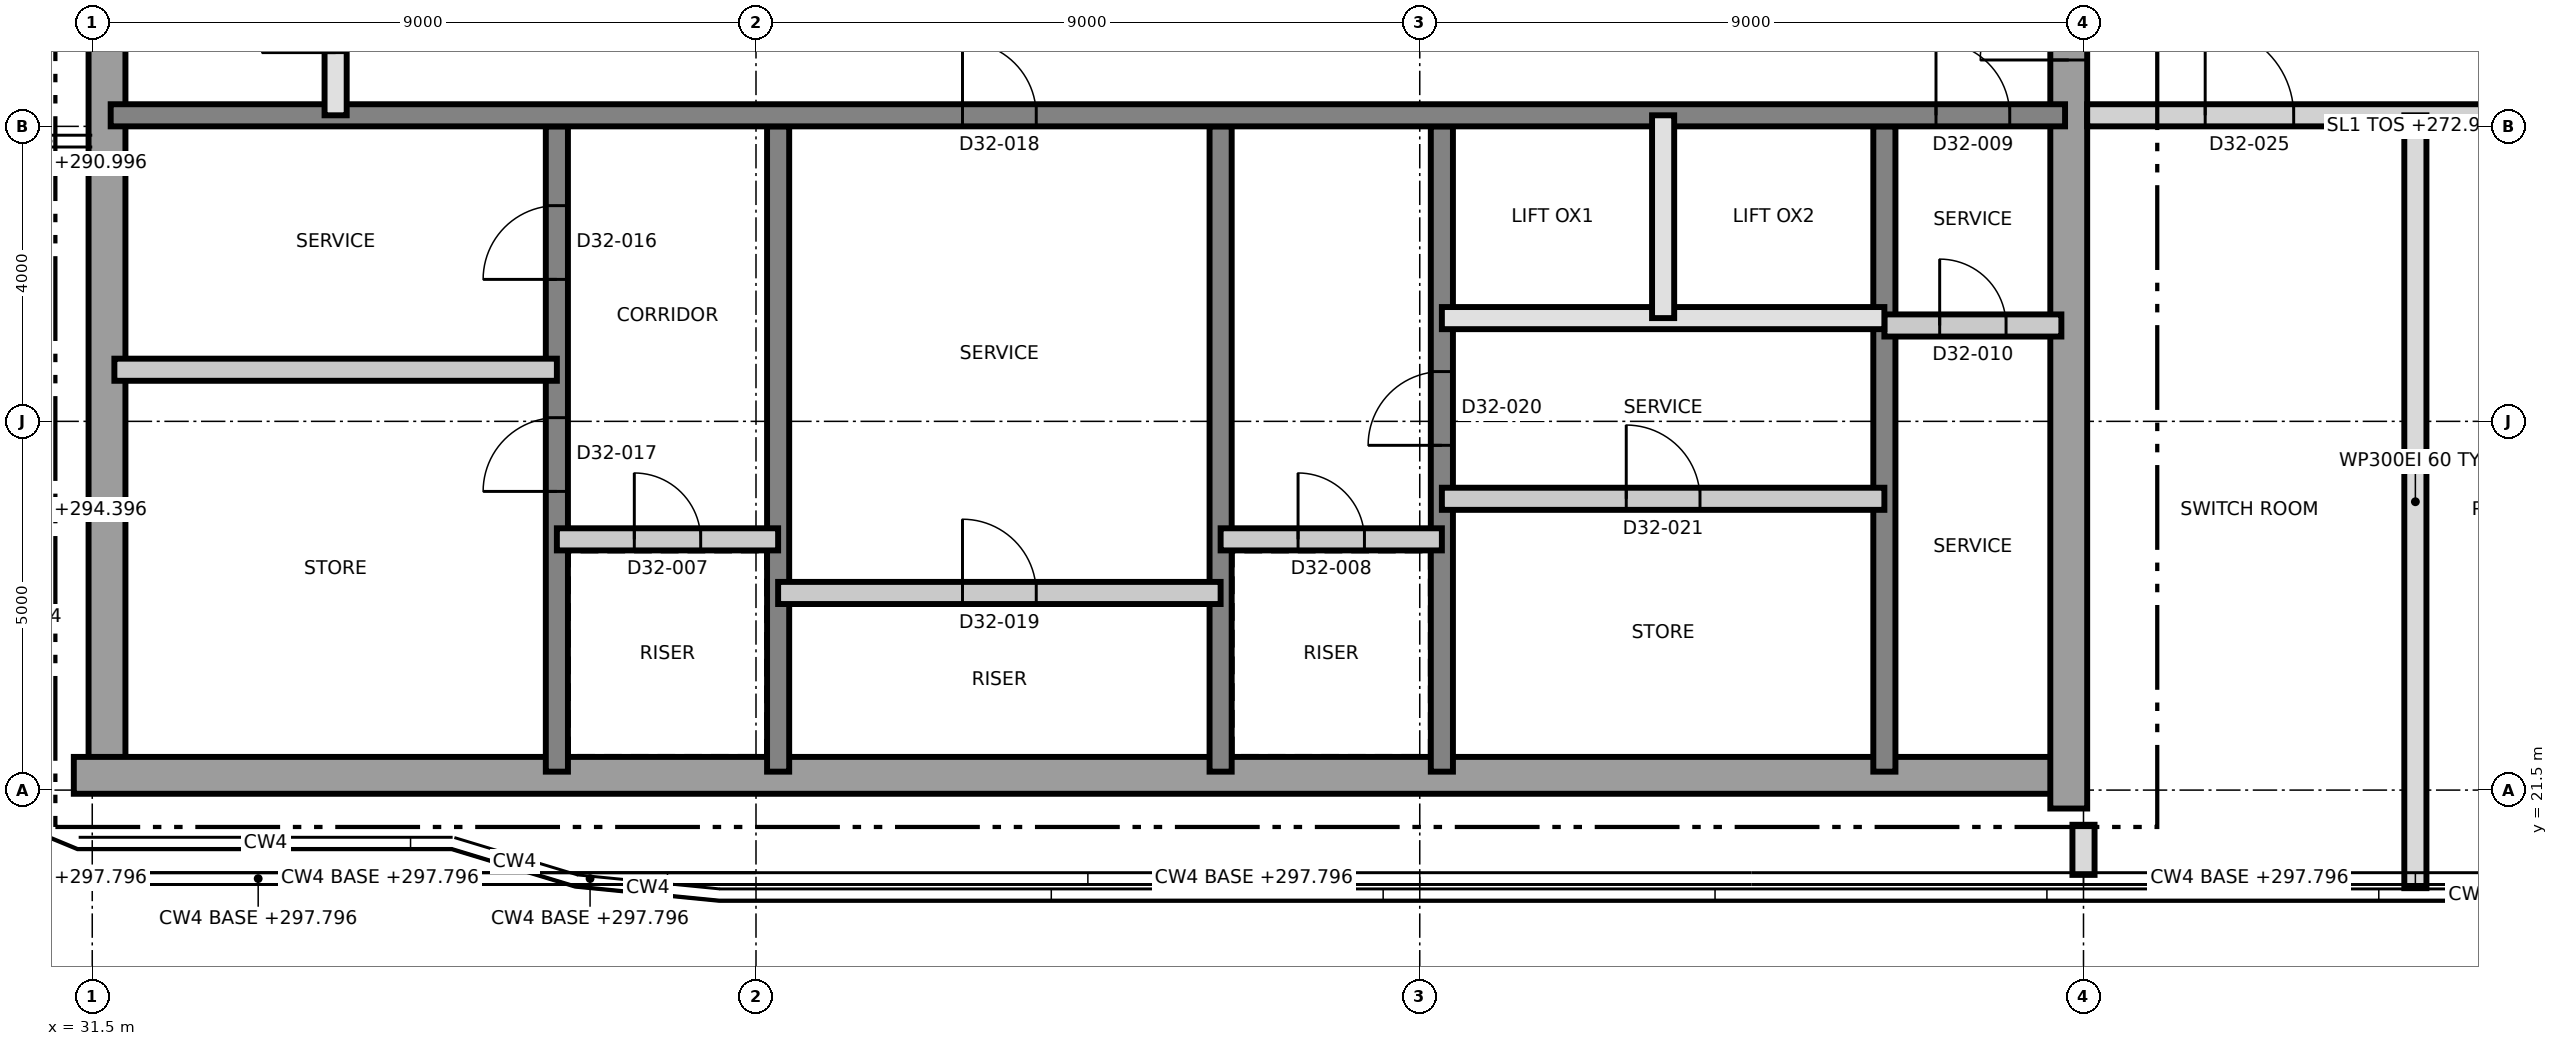
"""IFC4 building model, lengths in metres.
Left out: names, types, materials, properties, quantities, classifications, styles, units other than length and angle.
Written with IfcOpenShell. Run it as: python <this file> out.ifc"""

import sys

from ifc_helpers import new_model, si_unit, direction, frame, frame_2d, origin, place, context, subcontext, project, spatial, rectangle, extrude, element, fill, save


model = new_model("IFC4")
c1 = context("Model", 3, precision=1e-05, world=origin(), true_north=direction((0.0, 1.0)))
c2 = subcontext(c1, "Body", "Model", "MODEL_VIEW")
j1 = project(units=[si_unit("LENGTHUNIT", "METRE"), si_unit("PLANEANGLEUNIT", "RADIAN")], contexts=[c1])
p1 = place(None, origin())
s1 = spatial("IfcSite", under=j1, at=p1, CompositionType="ELEMENT")
p2 = place(p1, origin())
s2 = spatial("IfcBuilding", under=s1, at=p2, CompositionType="ELEMENT")
p3 = place(p2, frame((0.0, 0.0, 272.9)))
s3 = spatial("IfcBuildingStorey", under=s2, at=p3, CompositionType="ELEMENT", Elevation=272.9)
p4 = place(p3, frame((31.7, 21.75, 0.0), z_axis=(0.0, 0.0, 1.0), x_axis=(0.0, 1.0, 0.0)))
e1 = element("IfcWall", 1, at=p4, inside=s3, PredefinedType="SHEAR", context=c2, shape_type="SweptSolid", body=[
    extrude(rectangle(XDim=17.5, YDim=0.5, at=frame_2d((8.75, 0.0))), origin(), (0.0, 0.0, 1.0), 4.2),
])
p5 = place(p3, frame((31.25, 21.7, 0.0), z_axis=(0.0, 0.0, 1.0), x_axis=(1.0, 0.0, 0.0)))
e2 = element("IfcWall", 2, at=p5, inside=s3, PredefinedType="SHEAR", context=c2, shape_type="SweptSolid", body=[
    extrude(rectangle(XDim=27.0, YDim=0.5, at=frame_2d((13.5, 0.0))), origin(), (0.0, 0.0, 1.0), 4.2),
])
p6 = place(p3, frame((58.3, 21.25, 0.0), z_axis=(0.0, 0.0, 1.0), x_axis=(0.0, 1.0, 0.0)))
e3 = element("IfcWall", 3, at=p6, inside=s3, PredefinedType="SHEAR", context=c2, shape_type="SweptSolid", body=[
    extrude(rectangle(XDim=18.5, YDim=0.5, at=frame_2d((9.25, 0.0))), origin(), (0.0, 0.0, 1.0), 4.2),
])
p7 = place(p6, frame((10.15, 0.0, 0.0)))
e4 = element("IfcOpeningElement", 4, at=p7, cuts=e3, PredefinedType="OPENING", context=c2, shape_type="SweptSolid", body=[
    extrude(rectangle(XDim=1.2, YDim=2.1, at=frame_2d((0.6, 1.05))), frame((0.0, 0.26, 0.0), z_axis=(0.0, -1.0, 0.0), x_axis=(1.0, 0.0, 0.0)), (0.0, 0.0, 1.0), 0.52),
])
p8 = place(p3, frame((37.8, 21.75, 0.0), z_axis=(0.0, 0.0, 1.0), x_axis=(0.0, 1.0, 0.0)))
e5 = element("IfcWall", 5, at=p8, inside=s3, PredefinedType="SHEAR", context=c2, shape_type="SweptSolid", body=[
    extrude(rectangle(XDim=8.75, YDim=0.3, at=frame_2d((4.375, 0.0))), origin(), (0.0, 0.0, 1.0), 4.2),
])
p9 = place(p8, frame((6.675, 0.0, 0.0)))
e6 = element("IfcOpeningElement", 6, at=p9, cuts=e5, PredefinedType="OPENING", context=c2, shape_type="SweptSolid", body=[
    extrude(rectangle(XDim=1.0, YDim=2.1, at=frame_2d((0.5, 1.05))), frame((0.0, 0.16, 0.0), z_axis=(0.0, -1.0, 0.0), x_axis=(1.0, 0.0, 0.0)), (0.0, 0.0, 1.0), 0.32),
])
p10 = place(p8, frame((3.8, 0.0, 0.0)))
e7 = element("IfcOpeningElement", 7, at=p10, cuts=e5, PredefinedType="OPENING", context=c2, shape_type="SweptSolid", body=[
    extrude(rectangle(XDim=1.0, YDim=2.1, at=frame_2d((0.5, 1.05))), frame((0.0, 0.16, 0.0), z_axis=(0.0, -1.0, 0.0), x_axis=(1.0, 0.0, 0.0)), (0.0, 0.0, 1.0), 0.32),
])
for number, where, z_axis, x_axis in (
    (8, (40.8, 21.75, 0.0), (0.0, 0.0, 1.0), (0.0, 1.0, 0.0)),
    (9, (46.8, 21.75, 0.0), (0.0, 0.0, 1.0), (0.0, 1.0, 0.0)),
):
    element("IfcWall", number, at=place(p3, frame(where, z_axis=z_axis, x_axis=x_axis)), inside=s3, PredefinedType="SHEAR", context=c2, shape_type="SweptSolid", body=[
        extrude(rectangle(XDim=8.75, YDim=0.3, at=frame_2d((4.375, 0.0))), origin(), (0.0, 0.0, 1.0), 4.2),
    ])
p11 = place(p3, frame((49.8, 21.75, 0.0), z_axis=(0.0, 0.0, 1.0), x_axis=(0.0, 1.0, 0.0)))
e10 = element("IfcWall", 10, at=p11, inside=s3, PredefinedType="SHEAR", context=c2, shape_type="SweptSolid", body=[
    extrude(rectangle(XDim=8.75, YDim=0.3, at=frame_2d((4.375, 0.0))), origin(), (0.0, 0.0, 1.0), 4.2),
])
p12 = place(p11, frame((4.425, 0.0, 0.0)))
e11 = element("IfcOpeningElement", 11, at=p12, cuts=e10, PredefinedType="OPENING", context=c2, shape_type="SweptSolid", body=[
    extrude(rectangle(XDim=1.0, YDim=2.1, at=frame_2d((0.5, 1.05))), frame((0.0, 0.16, 0.0), z_axis=(0.0, -1.0, 0.0), x_axis=(1.0, 0.0, 0.0)), (0.0, 0.0, 1.0), 0.32),
])
p13 = place(p3, frame((55.8, 21.75, 0.0), z_axis=(0.0, 0.0, 1.0), x_axis=(0.0, 1.0, 0.0)))
e12 = element("IfcWall", 12, at=p13, inside=s3, PredefinedType="SHEAR", context=c2, shape_type="SweptSolid", body=[
    extrude(rectangle(XDim=8.75, YDim=0.3, at=frame_2d((4.375, 0.0))), origin(), (0.0, 0.0, 1.0), 4.2),
])
p14 = place(p3, frame((31.75, 30.65, 0.0), z_axis=(0.0, 0.0, 1.0), x_axis=(1.0, 0.0, 0.0)))
e13 = element("IfcWall", 13, at=p14, inside=s3, PredefinedType="SHEAR", context=c2, shape_type="SweptSolid", body=[
    extrude(rectangle(XDim=26.5, YDim=0.3, at=frame_2d((13.25, 0.0))), origin(), (0.0, 0.0, 1.0), 4.2),
])
p15 = place(p14, frame((24.75, 0.0, 0.0)))
e14 = element("IfcOpeningElement", 14, at=p15, cuts=e13, PredefinedType="OPENING", context=c2, shape_type="SweptSolid", body=[
    extrude(rectangle(XDim=1.0, YDim=2.1, at=frame_2d((0.5, 1.05))), frame((0.0, 0.16, 0.0), z_axis=(0.0, -1.0, 0.0), x_axis=(1.0, 0.0, 0.0)), (0.0, 0.0, 1.0), 0.32),
])
p16 = place(p14, frame((11.55, 0.0, 0.0)))
e15 = element("IfcOpeningElement", 15, at=p16, cuts=e13, PredefinedType="OPENING", context=c2, shape_type="SweptSolid", body=[
    extrude(rectangle(XDim=1.0, YDim=2.1, at=frame_2d((0.5, 1.05))), frame((0.0, 0.16, 0.0), z_axis=(0.0, -1.0, 0.0), x_axis=(1.0, 0.0, 0.0)), (0.0, 0.0, 1.0), 0.32),
])
p17 = place(p3, frame((40.8, 24.173, 0.0), z_axis=(0.0, 0.0, 1.0), x_axis=(1.0, 0.0, 0.0)))
e16 = element("IfcWall", 16, at=p17, inside=s3, PredefinedType="PARTITIONING", context=c2, shape_type="SweptSolid", body=[
    extrude(rectangle(XDim=6.0, YDim=0.3, at=frame_2d((3.0, 0.0))), origin(), (0.0, 0.0, 1.0), 3.9),
])
p18 = place(p17, frame((2.5, 0.0, 0.0)))
e17 = element("IfcOpeningElement", 17, at=p18, cuts=e16, PredefinedType="OPENING", context=c2, shape_type="SweptSolid", body=[
    extrude(rectangle(XDim=1.0, YDim=2.1, at=frame_2d((0.5, 1.05))), frame((0.0, 0.16, 0.0), z_axis=(0.0, -1.0, 0.0), x_axis=(1.0, 0.0, 0.0)), (0.0, 0.0, 1.0), 0.32),
])
p19 = place(p3, frame((37.8, 24.9, 0.0), z_axis=(0.0, 0.0, 1.0), x_axis=(1.0, 0.0, 0.0)))
e18 = element("IfcWall", 18, at=p19, inside=s3, PredefinedType="PARTITIONING", context=c2, shape_type="SweptSolid", body=[
    extrude(rectangle(XDim=3.0, YDim=0.3, at=frame_2d((1.5, 0.0))), origin(), (0.0, 0.0, 1.0), 3.9),
])
p20 = place(p19, frame((1.05, 0.0, 0.0)))
e19 = element("IfcOpeningElement", 19, at=p20, cuts=e18, PredefinedType="OPENING", context=c2, shape_type="SweptSolid", body=[
    extrude(rectangle(XDim=0.9, YDim=2.1, at=frame_2d((0.45, 1.05))), frame((0.0, 0.16, 0.0), z_axis=(0.0, -1.0, 0.0), x_axis=(1.0, 0.0, 0.0)), (0.0, 0.0, 1.0), 0.32),
])
p21 = place(p3, frame((46.8, 24.9, 0.0), z_axis=(0.0, 0.0, 1.0), x_axis=(1.0, 0.0, 0.0)))
e20 = element("IfcWall", 20, at=p21, inside=s3, PredefinedType="PARTITIONING", context=c2, shape_type="SweptSolid", body=[
    extrude(rectangle(XDim=3.0, YDim=0.3, at=frame_2d((1.5, 0.0))), origin(), (0.0, 0.0, 1.0), 3.9),
])
p22 = place(p21, frame((1.05, 0.0, 0.0)))
e21 = element("IfcOpeningElement", 21, at=p22, cuts=e20, PredefinedType="OPENING", context=c2, shape_type="SweptSolid", body=[
    extrude(rectangle(XDim=0.9, YDim=2.1, at=frame_2d((0.45, 1.05))), frame((0.0, 0.16, 0.0), z_axis=(0.0, -1.0, 0.0), x_axis=(1.0, 0.0, 0.0)), (0.0, 0.0, 1.0), 0.32),
])
p23 = place(p3, frame((49.8, 25.45, 0.0), z_axis=(0.0, 0.0, 1.0), x_axis=(1.0, 0.0, 0.0)))
e22 = element("IfcWall", 22, at=p23, inside=s3, PredefinedType="PARTITIONING", context=c2, shape_type="SweptSolid", body=[
    extrude(rectangle(XDim=6.0, YDim=0.3, at=frame_2d((3.0, 0.0))), origin(), (0.0, 0.0, 1.0), 3.9),
])
p24 = place(p23, frame((2.5, 0.0, 0.0)))
e23 = element("IfcOpeningElement", 23, at=p24, cuts=e22, PredefinedType="OPENING", context=c2, shape_type="SweptSolid", body=[
    extrude(rectangle(XDim=1.0, YDim=2.1, at=frame_2d((0.5, 1.05))), frame((0.0, 0.16, 0.0), z_axis=(0.0, -1.0, 0.0), x_axis=(1.0, 0.0, 0.0)), (0.0, 0.0, 1.0), 0.32),
])
p25 = place(p3, frame((31.8, 27.2, 0.0), z_axis=(0.0, 0.0, 1.0), x_axis=(1.0, 0.0, 0.0)))
e24 = element("IfcWall", 24, at=p25, inside=s3, PredefinedType="PARTITIONING", context=c2, shape_type="SweptSolid", body=[
    extrude(rectangle(XDim=6.0, YDim=0.3, at=frame_2d((3.0, 0.0))), origin(), (0.0, 0.0, 1.0), 3.9),
])
p26 = place(p3, frame((55.8, 27.8, 0.0), z_axis=(0.0, 0.0, 1.0), x_axis=(1.0, 0.0, 0.0)))
e25 = element("IfcWall", 25, at=p26, inside=s3, PredefinedType="PARTITIONING", context=c2, shape_type="SweptSolid", body=[
    extrude(rectangle(XDim=2.4, YDim=0.3, at=frame_2d((1.2, 0.0))), origin(), (0.0, 0.0, 1.0), 3.9),
])
p27 = place(p26, frame((0.75, 0.0, 0.0)))
e26 = element("IfcOpeningElement", 26, at=p27, cuts=e25, PredefinedType="OPENING", context=c2, shape_type="SweptSolid", body=[
    extrude(rectangle(XDim=0.9, YDim=2.1, at=frame_2d((0.45, 1.05))), frame((0.0, 0.16, 0.0), z_axis=(0.0, -1.0, 0.0), x_axis=(1.0, 0.0, 0.0)), (0.0, 0.0, 1.0), 0.32),
])
p28 = place(p3, frame((49.8, 27.9, 0.0), z_axis=(0.0, 0.0, 1.0), x_axis=(1.0, 0.0, 0.0)))
e27 = element("IfcWall", 27, at=p28, inside=s3, PredefinedType="SOLIDWALL", context=c2, shape_type="SweptSolid", body=[
    extrude(rectangle(XDim=6.0, YDim=0.3, at=frame_2d((3.0, 0.0))), origin(), (0.0, 0.0, 1.0), 3.9),
])
p29 = place(p3, frame((34.8, 30.65, 0.0), z_axis=(0.0, 0.0, 1.0), x_axis=(0.0, 1.0, 0.0)))
e28 = element("IfcWall", 28, at=p29, inside=s3, PredefinedType="SOLIDWALL", context=c2, shape_type="SweptSolid", body=[
    extrude(rectangle(XDim=2.7, YDim=0.3, at=frame_2d((1.35, 0.0))), origin(), (0.0, 0.0, 1.0), 3.9),
])
p30 = place(p29, frame((0.85, 0.0, 0.0)))
e29 = element("IfcOpeningElement", 29, at=p30, cuts=e28, PredefinedType="OPENING", context=c2, shape_type="SweptSolid", body=[
    extrude(rectangle(XDim=1.0, YDim=2.1, at=frame_2d((0.5, 1.05))), frame((0.0, 0.16, 0.0), z_axis=(0.0, -1.0, 0.0), x_axis=(1.0, 0.0, 0.0)), (0.0, 0.0, 1.0), 0.32),
])
p31 = place(p3, frame((52.8, 27.9, 0.0), z_axis=(0.0, 0.0, 1.0), x_axis=(0.0, 1.0, 0.0)))
e30 = element("IfcWall", 30, at=p31, inside=s3, PredefinedType="SOLIDWALL", context=c2, shape_type="SweptSolid", body=[
    extrude(rectangle(XDim=2.75, YDim=0.3, at=frame_2d((1.375, 0.0))), origin(), (0.0, 0.0, 1.0), 3.9),
])
p32 = place(p3, frame((58.55, 30.65, 0.0), z_axis=(0.0, 0.0, 1.0), x_axis=(1.0, 0.0, 0.0)))
e31 = element("IfcWall", 31, at=p32, inside=s3, PredefinedType="PARTITIONING", context=c2, shape_type="SweptSolid", body=[
    extrude(rectangle(XDim=26.78, YDim=0.3, at=frame_2d((13.39, 0.0))), origin(), (0.0, 0.0, 1.0), 3.9),
])
p33 = place(p32, frame((1.6, 0.0, 0.0)))
e32 = element("IfcOpeningElement", 32, at=p33, cuts=e31, PredefinedType="OPENING", context=c2, shape_type="SweptSolid", body=[
    extrude(rectangle(XDim=1.2, YDim=2.1, at=frame_2d((0.6, 1.05))), frame((0.0, 0.16, 0.0), z_axis=(0.0, -1.0, 0.0), x_axis=(1.0, 0.0, 0.0)), (0.0, 0.0, 1.0), 0.32),
])
p34 = place(p32, frame((6.1, 0.0, 0.0)))
e33 = element("IfcOpeningElement", 33, at=p34, cuts=e31, PredefinedType="OPENING", context=c2, shape_type="SweptSolid", body=[
    extrude(rectangle(XDim=1.2, YDim=2.1, at=frame_2d((0.6, 1.05))), frame((0.0, 0.16, 0.0), z_axis=(0.0, -1.0, 0.0), x_axis=(1.0, 0.0, 0.0)), (0.0, 0.0, 1.0), 0.32),
])
p35 = place(p32, frame((10.6, 0.0, 0.0)))
e34 = element("IfcOpeningElement", 34, at=p35, cuts=e31, PredefinedType="OPENING", context=c2, shape_type="SweptSolid", body=[
    extrude(rectangle(XDim=1.2, YDim=2.1, at=frame_2d((0.6, 1.05))), frame((0.0, 0.16, 0.0), z_axis=(0.0, -1.0, 0.0), x_axis=(1.0, 0.0, 0.0)), (0.0, 0.0, 1.0), 0.32),
])
p36 = place(p32, frame((15.1, 0.0, 0.0)))
e35 = element("IfcOpeningElement", 35, at=p36, cuts=e31, PredefinedType="OPENING", context=c2, shape_type="SweptSolid", body=[
    extrude(rectangle(XDim=1.2, YDim=2.1, at=frame_2d((0.6, 1.05))), frame((0.0, 0.16, 0.0), z_axis=(0.0, -1.0, 0.0), x_axis=(1.0, 0.0, 0.0)), (0.0, 0.0, 1.0), 0.32),
])
p37 = place(p32, frame((19.6, 0.0, 0.0)))
e36 = element("IfcOpeningElement", 36, at=p37, cuts=e31, PredefinedType="OPENING", context=c2, shape_type="SweptSolid", body=[
    extrude(rectangle(XDim=1.2, YDim=2.1, at=frame_2d((0.6, 1.05))), frame((0.0, 0.16, 0.0), z_axis=(0.0, -1.0, 0.0), x_axis=(1.0, 0.0, 0.0)), (0.0, 0.0, 1.0), 0.32),
])
p38 = place(p32, frame((24.1, 0.0, 0.0)))
e37 = element("IfcOpeningElement", 37, at=p38, cuts=e31, PredefinedType="OPENING", context=c2, shape_type="SweptSolid", body=[
    extrude(rectangle(XDim=1.2, YDim=2.1, at=frame_2d((0.6, 1.05))), frame((0.0, 0.16, 0.0), z_axis=(0.0, -1.0, 0.0), x_axis=(1.0, 0.0, 0.0)), (0.0, 0.0, 1.0), 0.32),
])
p39 = place(p3, frame((58.5, 20.35, 0.0), z_axis=(0.0, 0.0, 1.0), x_axis=(0.0, 1.0, 0.0)))
e38 = element("IfcWall", 38, at=p39, inside=s3, PredefinedType="PARTITIONING", context=c2, shape_type="SweptSolid", body=[
    extrude(rectangle(XDim=0.68, YDim=0.3, at=frame_2d((0.34, 0.0))), origin(), (0.0, 0.0, 1.0), 3.9),
])
p40 = place(p3, frame((63.0, 20.17, 0.0), z_axis=(0.0, 0.0, 1.0), x_axis=(0.0, 1.0, 0.0)))
e39 = element("IfcWall", 39, at=p40, inside=s3, PredefinedType="PARTITIONING", context=c2, shape_type="SweptSolid", body=[
    extrude(rectangle(XDim=10.48, YDim=0.3, at=frame_2d((5.24, 0.0))), origin(), (0.0, 0.0, 1.0), 3.9),
])
p41 = place(p20, origin())
e40 = element("IfcDoor", 40, at=p41, inside=s3, OperationType="SINGLE_SWING_LEFT", PredefinedType="DOOR", context=c2, shape_type="SweptSolid", body=[
    extrude(rectangle(XDim=0.9, YDim=2.1, at=frame_2d((0.45, 1.05))), frame((0.0, 0.025, 0.0), z_axis=(0.0, -1.0, 0.0), x_axis=(1.0, 0.0, 0.0)), (0.0, 0.0, 1.0), 0.05),
])
fill(e19, e40)
p42 = place(p22, origin())
e41 = element("IfcDoor", 41, at=p42, inside=s3, OperationType="SINGLE_SWING_RIGHT", PredefinedType="DOOR", context=c2, shape_type="SweptSolid", body=[
    extrude(rectangle(XDim=0.9, YDim=2.1, at=frame_2d((0.45, 1.05))), frame((0.0, 0.025, 0.0), z_axis=(0.0, -1.0, 0.0), x_axis=(1.0, 0.0, 0.0)), (0.0, 0.0, 1.0), 0.05),
])
fill(e21, e41)
p43 = place(p15, origin())
e42 = element("IfcDoor", 42, at=p43, inside=s3, OperationType="SINGLE_SWING_LEFT", PredefinedType="DOOR", context=c2, shape_type="SweptSolid", body=[
    extrude(rectangle(XDim=1.0, YDim=2.1, at=frame_2d((0.5, 1.05))), frame((0.0, 0.025, 0.0), z_axis=(0.0, -1.0, 0.0), x_axis=(1.0, 0.0, 0.0)), (0.0, 0.0, 1.0), 0.05),
])
fill(e14, e42)
p44 = place(p27, origin())
e43 = element("IfcDoor", 43, at=p44, inside=s3, OperationType="SINGLE_SWING_RIGHT", PredefinedType="DOOR", context=c2, shape_type="SweptSolid", body=[
    extrude(rectangle(XDim=0.9, YDim=2.1, at=frame_2d((0.45, 1.05))), frame((0.0, 0.025, 0.0), z_axis=(0.0, -1.0, 0.0), x_axis=(1.0, 0.0, 0.0)), (0.0, 0.0, 1.0), 0.05),
])
fill(e26, e43)
p45 = place(p7, origin())
e44 = element("IfcDoor", 44, at=p45, inside=s3, OperationType="SINGLE_SWING_LEFT", PredefinedType="DOOR", context=c2, shape_type="SweptSolid", body=[
    extrude(rectangle(XDim=1.2, YDim=2.1, at=frame_2d((0.6, 1.05))), frame((0.0, 0.025, 0.0), z_axis=(0.0, -1.0, 0.0), x_axis=(1.0, 0.0, 0.0)), (0.0, 0.0, 1.0), 0.05),
])
fill(e4, e44)
p46 = place(p9, origin())
e45 = element("IfcDoor", 45, at=p46, inside=s3, OperationType="SINGLE_SWING_LEFT", PredefinedType="DOOR", context=c2, shape_type="SweptSolid", body=[
    extrude(rectangle(XDim=1.0, YDim=2.1, at=frame_2d((0.5, 1.05))), frame((0.0, 0.025, 0.0), z_axis=(0.0, -1.0, 0.0), x_axis=(1.0, 0.0, 0.0)), (0.0, 0.0, 1.0), 0.05),
])
fill(e6, e45)
p47 = place(p10, origin())
e46 = element("IfcDoor", 46, at=p47, inside=s3, OperationType="SINGLE_SWING_RIGHT", PredefinedType="DOOR", context=c2, shape_type="SweptSolid", body=[
    extrude(rectangle(XDim=1.0, YDim=2.1, at=frame_2d((0.5, 1.05))), frame((0.0, 0.025, 0.0), z_axis=(0.0, -1.0, 0.0), x_axis=(1.0, 0.0, 0.0)), (0.0, 0.0, 1.0), 0.05),
])
fill(e7, e46)
p48 = place(p16, origin())
e47 = element("IfcDoor", 47, at=p48, inside=s3, OperationType="SINGLE_SWING_LEFT", PredefinedType="DOOR", context=c2, shape_type="SweptSolid", body=[
    extrude(rectangle(XDim=1.0, YDim=2.1, at=frame_2d((0.5, 1.05))), frame((0.0, 0.025, 0.0), z_axis=(0.0, -1.0, 0.0), x_axis=(1.0, 0.0, 0.0)), (0.0, 0.0, 1.0), 0.05),
])
fill(e15, e47)
p49 = place(p18, origin())
e48 = element("IfcDoor", 48, at=p49, inside=s3, OperationType="SINGLE_SWING_RIGHT", PredefinedType="DOOR", context=c2, shape_type="SweptSolid", body=[
    extrude(rectangle(XDim=1.0, YDim=2.1, at=frame_2d((0.5, 1.05))), frame((0.0, 0.025, 0.0), z_axis=(0.0, -1.0, 0.0), x_axis=(1.0, 0.0, 0.0)), (0.0, 0.0, 1.0), 0.05),
])
fill(e17, e48)
p50 = place(p12, origin())
e49 = element("IfcDoor", 49, at=p50, inside=s3, OperationType="SINGLE_SWING_LEFT", PredefinedType="DOOR", context=c2, shape_type="SweptSolid", body=[
    extrude(rectangle(XDim=1.0, YDim=2.1, at=frame_2d((0.5, 1.05))), frame((0.0, 0.025, 0.0), z_axis=(0.0, -1.0, 0.0), x_axis=(1.0, 0.0, 0.0)), (0.0, 0.0, 1.0), 0.05),
])
fill(e11, e49)
p51 = place(p24, origin())
e50 = element("IfcDoor", 50, at=p51, inside=s3, OperationType="SINGLE_SWING_RIGHT", PredefinedType="DOOR", context=c2, shape_type="SweptSolid", body=[
    extrude(rectangle(XDim=1.0, YDim=2.1, at=frame_2d((0.5, 1.05))), frame((0.0, 0.025, 0.0), z_axis=(0.0, -1.0, 0.0), x_axis=(1.0, 0.0, 0.0)), (0.0, 0.0, 1.0), 0.05),
])
fill(e23, e50)
p52 = place(p33, origin())
e51 = element("IfcDoor", 51, at=p52, inside=s3, OperationType="SINGLE_SWING_RIGHT", PredefinedType="DOOR", context=c2, shape_type="SweptSolid", body=[
    extrude(rectangle(XDim=1.2, YDim=2.1, at=frame_2d((0.6, 1.05))), frame((0.0, 0.025, 0.0), z_axis=(0.0, -1.0, 0.0), x_axis=(1.0, 0.0, 0.0)), (0.0, 0.0, 1.0), 0.05),
])
fill(e32, e51)
save(model, sys.argv[1])
